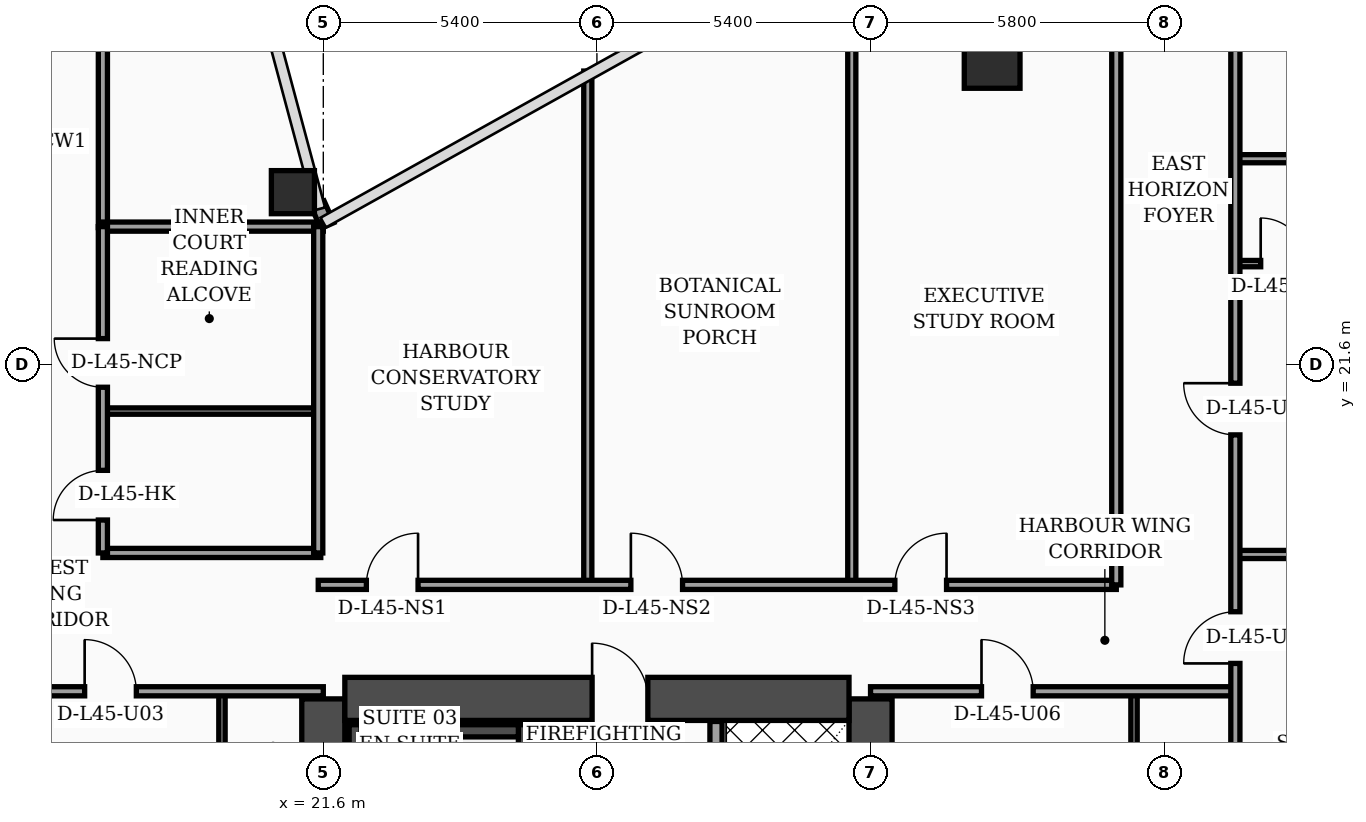
"""IFC4 building model, lengths in metres.
Left out: names, types, materials, properties, quantities, classifications, styles, units other than length and angle.
Written with IfcOpenShell. Run it as: python <this file> out.ifc"""

import sys

from ifc_helpers import new_model, si_unit, direction, frame, frame_2d, origin, origin_2d, place, context, subcontext, project, spatial, rectangle, hollow_rectangle, circle, extrude, element, fill, save


model = new_model("IFC4")
c1 = context("Model", 3, precision=1e-05, world=origin(), true_north=direction((0.0, 1.0)))
c2 = subcontext(c1, "Body", "Model", "MODEL_VIEW")
j1 = project(units=[si_unit("LENGTHUNIT", "METRE"), si_unit("PLANEANGLEUNIT", "RADIAN")], contexts=[c1])
p1 = place(None, origin())
s1 = spatial("IfcSite", under=j1, at=p1, CompositionType="ELEMENT")
p2 = place(p1, origin())
s2 = spatial("IfcBuilding", under=s1, at=p2, CompositionType="ELEMENT")
p3 = place(p2, frame((0.0, 0.0, 182.7)))
s3 = spatial("IfcBuildingStorey", under=s2, at=p3, CompositionType="ELEMENT", Elevation=182.7)
for number, where, z_axis, x_axis in (
    (1, (21.6, 4.6, 0.0), (0.0, 0.0, 1.0), (0.0, 1.0, 0.0)),
    (2, (32.4, 4.6, 0.0), (0.0, 0.0, 1.0), (0.0, 1.0, 0.0)),
):
    element("IfcWall", number, at=place(p3, frame(where, z_axis=z_axis, x_axis=x_axis)), inside=s3, PredefinedType="SHEAR", context=c2, shape_type="SweptSolid", body=[
        extrude(rectangle(XDim=10.4, YDim=0.85, at=frame_2d((5.2, 0.0))), origin(), (0.0, 0.0, 1.0), 3.52),
    ])
p4 = place(p3, frame((22.025, 15.0, 0.0), z_axis=(0.0, 0.0, 1.0), x_axis=(1.0, 0.0, 0.0)))
e3 = element("IfcWall", 3, at=p4, inside=s3, PredefinedType="SHEAR", context=c2, shape_type="SweptSolid", body=[
    extrude(rectangle(XDim=9.95, YDim=0.85, at=frame_2d((4.975, 0.0))), origin(), (0.0, 0.0, 1.0), 3.52),
])
p5 = place(p4, frame((4.88, 0.0, 0.0)))
e4 = element("IfcOpeningElement", 4, at=p5, cuts=e3, PredefinedType="OPENING", context=c2, shape_type="SweptSolid", body=[
    extrude(rectangle(XDim=1.1, YDim=2.2, at=frame_2d((0.55, 1.1))), frame((0.0, 0.435, 0.0), z_axis=(0.0, -1.0, 0.0), x_axis=(1.0, 0.0, 0.0)), (0.0, 0.0, 1.0), 0.87),
])
p6 = place(p3, frame((22.23, 5.025, 0.0), z_axis=(0.0, 0.0, 1.0), x_axis=(0.0, 1.0, 0.0)))
e5 = element("IfcWall", 5, at=p6, inside=s3, PredefinedType="SOLIDWALL", context=c2, shape_type="SweptSolid", body=[
    extrude(rectangle(XDim=9.465, YDim=0.24, at=frame_2d((4.732, 0.0))), origin(), (0.0, 0.0, 1.0), 3.52),
])
p7 = place(p3, frame((25.57, 5.025, 0.0), z_axis=(0.0, 0.0, 1.0), x_axis=(0.0, 1.0, 0.0)))
e6 = element("IfcWall", 6, at=p7, inside=s3, PredefinedType="SOLIDWALL", context=c2, shape_type="SweptSolid", body=[
    extrude(rectangle(XDim=9.465, YDim=0.24, at=frame_2d((4.732, 0.0))), origin(), (0.0, 0.0, 1.0), 3.52),
])
p8 = place(p7, frame((0.35, 0.0, 0.0)))
e7 = element("IfcOpeningElement", 7, at=p8, cuts=e6, PredefinedType="OPENING", context=c2, shape_type="SweptSolid", body=[
    extrude(rectangle(XDim=1.15, YDim=2.2, at=frame_2d((0.575, 1.1))), frame((0.0, 0.13, 0.0), z_axis=(0.0, -1.0, 0.0), x_axis=(1.0, 0.0, 0.0)), (0.0, 0.0, 1.0), 0.26),
])
p9 = place(p3, frame((22.35, 14.37, 0.0), z_axis=(0.0, 0.0, 1.0), x_axis=(1.0, 0.0, 0.0)))
e8 = element("IfcWall", 8, at=p9, inside=s3, PredefinedType="SOLIDWALL", context=c2, shape_type="SweptSolid", body=[
    extrude(rectangle(XDim=3.1, YDim=0.24, at=frame_2d((1.55, 0.0))), origin(), (0.0, 0.0, 1.0), 3.52),
])
p10 = place(p3, frame((21.0, 25.0, 0.0), z_axis=(0.0, 0.0, 1.0), x_axis=(1.0, 0.0, 0.0)))
e9 = element("IfcColumn", 9, at=p10, inside=s3, PredefinedType="COLUMN", context=c2, shape_type="SweptSolid", body=[
    extrude(hollow_rectangle(XDim=0.85, YDim=0.85, WallThickness=0.036, at=origin_2d()), origin(), (0.0, 0.0, 1.0), 3.52),
])
p11 = place(p3, frame((34.8, 27.6, 0.0), z_axis=(0.0, 0.0, 1.0), x_axis=(1.0, 0.0, 0.0)))
e10 = element("IfcColumn", 10, at=p11, inside=s3, PredefinedType="COLUMN", context=c2, shape_type="SweptSolid", body=[
    extrude(circle(Radius=0.55, at=origin_2d()), origin(), (0.0, 0.0, 1.0), 3.52),
])
p12 = place(p3, frame((21.68, 24.34, 0.0), z_axis=(0.0, 0.0, 1.0), x_axis=(-0.40758134973, 0.913168901875, 0.0)))
e11 = element("IfcWall", 11, at=p12, inside=s3, PredefinedType="SOLIDWALL", context=c2, shape_type="SweptSolid", body=[
    extrude(rectangle(XDim=0.471, YDim=0.28, at=frame_2d((0.235, 0.0))), origin(), (0.0, 0.0, 1.0), 3.52),
])
p13 = place(p3, frame((29.35, 5.045, 0.0), z_axis=(0.0, 0.0, 1.0), x_axis=(0.0, 1.0, 0.0)))
e12 = element("IfcWall", 12, at=p13, inside=s3, PredefinedType="SOLIDWALL", context=c2, shape_type="SweptSolid", body=[
    extrude(rectangle(XDim=9.51, YDim=0.24, at=frame_2d((4.755, 0.0))), origin(), (0.0, 0.0, 1.0), 3.52),
])
p14 = place(p13, frame((0.55, 0.0, 0.0)))
e13 = element("IfcOpeningElement", 13, at=p14, cuts=e12, PredefinedType="OPENING", context=c2, shape_type="SweptSolid", body=[
    extrude(rectangle(XDim=1.3, YDim=2.35, at=frame_2d((0.65, 1.175))), frame((0.0, 0.13, 0.0), z_axis=(0.0, -1.0, 0.0), x_axis=(1.0, 0.0, 0.0)), (0.0, 0.0, 1.0), 0.26),
])
p15 = place(p3, frame((19.6, 2.44, 0.0), z_axis=(0.0, 0.0, 1.0), x_axis=(0.0, 1.0, 0.0)))
e14 = element("IfcWall", 14, at=p15, inside=s3, PredefinedType="PARTITIONING", context=c2, shape_type="SweptSolid", body=[
    extrude(rectangle(XDim=12.71, YDim=0.125, at=frame_2d((6.355, 0.0))), origin(), (0.0, 0.0, 1.0), 2.47),
])
p16 = place(p15, frame((4.34, 0.0, 0.0)))
e15 = element("IfcOpeningElement", 15, at=p16, cuts=e14, PredefinedType="OPENING", context=c2, shape_type="SweptSolid", body=[
    extrude(rectangle(XDim=0.96, YDim=2.2, at=frame_2d((0.48, 1.1))), frame((0.0, 0.073, 0.0), z_axis=(0.0, -1.0, 0.0), x_axis=(1.0, 0.0, 0.0)), (0.0, 0.0, 1.0), 0.145),
])
p17 = place(p15, frame((10.18, 0.0, 0.0)))
e16 = element("IfcOpeningElement", 16, at=p17, cuts=e14, PredefinedType="OPENING", context=c2, shape_type="SweptSolid", body=[
    extrude(rectangle(XDim=0.9, YDim=2.15, at=frame_2d((0.45, 1.075))), frame((0.0, 0.073, 0.0), z_axis=(0.0, -1.0, 0.0), x_axis=(1.0, 0.0, 0.0)), (0.0, 0.0, 1.0), 0.145),
])
p18 = place(p3, frame((15.15, 15.15, 0.0), z_axis=(0.0, 0.0, 1.0), x_axis=(1.0, 0.0, 0.0)))
e17 = element("IfcWall", 17, at=p18, inside=s3, PredefinedType="PARTITIONING", context=c2, shape_type="SweptSolid", body=[
    extrude(rectangle(XDim=6.45, YDim=0.18, at=frame_2d((3.225, 0.0))), origin(), (0.0, 0.0, 1.0), 2.47),
])
p19 = place(p18, frame((1.74, 0.0, 0.0)))
e18 = element("IfcOpeningElement", 18, at=p19, cuts=e17, PredefinedType="OPENING", context=c2, shape_type="SweptSolid", body=[
    extrude(rectangle(XDim=1.02, YDim=2.2, at=frame_2d((0.51, 1.1))), frame((0.0, 0.1, 0.0), z_axis=(0.0, -1.0, 0.0), x_axis=(1.0, 0.0, 0.0)), (0.0, 0.0, 1.0), 0.2),
])
p20 = place(p3, frame((17.25, 24.3, 0.0), z_axis=(0.0, 0.0, 1.0), x_axis=(0.0, 1.0, 0.0)))
e19 = element("IfcWall", 19, at=p20, inside=s3, PredefinedType="PARTITIONING", context=c2, shape_type="SweptSolid", body=[
    extrude(rectangle(XDim=17.65, YDim=0.18, at=frame_2d((8.825, 0.0))), origin(), (0.0, 0.0, 1.0), 2.92),
])
p21 = place(p3, frame((17.25, 17.88, 0.0), z_axis=(0.0, 0.0, 1.0), x_axis=(1.0, 0.0, 0.0)))
e20 = element("IfcWall", 20, at=p21, inside=s3, PredefinedType="PARTITIONING", context=c2, shape_type="SweptSolid", body=[
    extrude(rectangle(XDim=4.3, YDim=0.18, at=frame_2d((2.15, 0.0))), origin(), (0.0, 0.0, 1.0), 3.52),
])
p22 = place(p3, frame((17.25, 20.68, 0.0), z_axis=(0.0, 0.0, 1.0), x_axis=(1.0, 0.0, 0.0)))
e21 = element("IfcWall", 21, at=p22, inside=s3, PredefinedType="PARTITIONING", context=c2, shape_type="SweptSolid", body=[
    extrude(rectangle(XDim=4.3, YDim=0.125, at=frame_2d((2.15, 0.0))), origin(), (0.0, 0.0, 1.0), 3.52),
])
p23 = place(p3, frame((17.25, 24.32, 0.0), z_axis=(0.0, 0.0, 1.0), x_axis=(1.0, 0.0, 0.0)))
e22 = element("IfcWall", 22, at=p23, inside=s3, PredefinedType="PARTITIONING", context=c2, shape_type="SweptSolid", body=[
    extrude(rectangle(XDim=4.35, YDim=0.18, at=frame_2d((2.175, 0.0))), origin(), (0.0, 0.0, 1.0), 3.52),
])
p24 = place(p3, frame((21.5, 17.88, 0.0), z_axis=(0.0, 0.0, 1.0), x_axis=(0.0, 1.0, 0.0)))
e23 = element("IfcWall", 23, at=p24, inside=s3, PredefinedType="PARTITIONING", context=c2, shape_type="SweptSolid", body=[
    extrude(rectangle(XDim=6.44, YDim=0.18, at=frame_2d((3.22, 0.0))), origin(), (0.0, 0.0, 1.0), 3.52),
])
p25 = place(p3, frame((17.25, 17.88, 0.0), z_axis=(0.0, 0.0, 1.0), x_axis=(0.0, 1.0, 0.0)))
e24 = element("IfcWall", 24, at=p25, inside=s3, PredefinedType="PARTITIONING", context=c2, shape_type="SweptSolid", body=[
    extrude(rectangle(XDim=6.44, YDim=0.18, at=frame_2d((3.22, 0.0))), origin(), (0.0, 0.0, 1.0), 3.52),
])
p26 = place(p25, frame((0.65, 0.0, 0.0)))
e25 = element("IfcOpeningElement", 25, at=p26, cuts=e24, PredefinedType="OPENING", context=c2, shape_type="SweptSolid", body=[
    extrude(rectangle(XDim=0.98, YDim=2.15, at=frame_2d((0.49, 1.075))), frame((0.0, 0.1, 0.0), z_axis=(0.0, -1.0, 0.0), x_axis=(1.0, 0.0, 0.0)), (0.0, 0.0, 1.0), 0.2),
])
p27 = place(p25, frame((3.27, 0.0, 0.0)))
e26 = element("IfcOpeningElement", 26, at=p27, cuts=e24, PredefinedType="OPENING", context=c2, shape_type="SweptSolid", body=[
    extrude(rectangle(XDim=0.96, YDim=2.2, at=frame_2d((0.48, 1.1))), frame((0.0, 0.1, 0.0), z_axis=(0.0, -1.0, 0.0), x_axis=(1.0, 0.0, 0.0)), (0.0, 0.0, 1.0), 0.2),
])
p28 = place(p3, frame((37.6, 2.44, 0.0), z_axis=(0.0, 0.0, 1.0), x_axis=(0.0, 1.0, 0.0)))
e27 = element("IfcWall", 27, at=p28, inside=s3, PredefinedType="PARTITIONING", context=c2, shape_type="SweptSolid", body=[
    extrude(rectangle(XDim=12.71, YDim=0.125, at=frame_2d((6.355, 0.0))), origin(), (0.0, 0.0, 1.0), 2.92),
])
p29 = place(p28, frame((4.35, 0.0, 0.0)))
e28 = element("IfcOpeningElement", 28, at=p29, cuts=e27, PredefinedType="OPENING", context=c2, shape_type="SweptSolid", body=[
    extrude(rectangle(XDim=0.96, YDim=2.2, at=frame_2d((0.48, 1.1))), frame((0.0, 0.073, 0.0), z_axis=(0.0, -1.0, 0.0), x_axis=(1.0, 0.0, 0.0)), (0.0, 0.0, 1.0), 0.145),
])
p30 = place(p28, frame((10.21, 0.0, 0.0)))
e29 = element("IfcOpeningElement", 29, at=p30, cuts=e27, PredefinedType="OPENING", context=c2, shape_type="SweptSolid", body=[
    extrude(rectangle(XDim=0.9, YDim=2.15, at=frame_2d((0.45, 1.075))), frame((0.0, 0.073, 0.0), z_axis=(0.0, -1.0, 0.0), x_axis=(1.0, 0.0, 0.0)), (0.0, 0.0, 1.0), 0.145),
])
p31 = place(p3, frame((32.4, 15.15, 0.0), z_axis=(0.0, 0.0, 1.0), x_axis=(1.0, 0.0, 0.0)))
e30 = element("IfcWall", 30, at=p31, inside=s3, PredefinedType="PARTITIONING", context=c2, shape_type="SweptSolid", body=[
    extrude(rectangle(XDim=7.2, YDim=0.18, at=frame_2d((3.6, 0.0))), origin(), (0.0, 0.0, 1.0), 2.92),
])
p32 = place(p31, frame((2.19, 0.0, 0.0)))
e31 = element("IfcOpeningElement", 31, at=p32, cuts=e30, PredefinedType="OPENING", context=c2, shape_type="SweptSolid", body=[
    extrude(rectangle(XDim=1.02, YDim=2.2, at=frame_2d((0.51, 1.1))), frame((0.0, 0.1, 0.0), z_axis=(0.0, -1.0, 0.0), x_axis=(1.0, 0.0, 0.0)), (0.0, 0.0, 1.0), 0.2),
])
p33 = place(p3, frame((26.82, 17.25, 0.0), z_axis=(0.0, 0.0, 1.0), x_axis=(0.0, 1.0, 0.0)))
e32 = element("IfcWall", 32, at=p33, inside=s3, PredefinedType="PARTITIONING", context=c2, shape_type="SweptSolid", body=[
    extrude(rectangle(XDim=10.14, YDim=0.16, at=frame_2d((5.07, 0.0))), origin(), (0.0, 0.0, 1.0), 2.92),
])
p34 = place(p3, frame((32.03, 17.25, 0.0), z_axis=(0.0, 0.0, 1.0), x_axis=(0.0, 1.0, 0.0)))
e33 = element("IfcWall", 33, at=p34, inside=s3, PredefinedType="PARTITIONING", context=c2, shape_type="SweptSolid", body=[
    extrude(rectangle(XDim=13.04, YDim=0.16, at=frame_2d((6.52, 0.0))), origin(), (0.0, 0.0, 1.0), 2.92),
])
p35 = place(p3, frame((21.5, 17.25, 0.0), z_axis=(0.0, 0.0, 1.0), x_axis=(1.0, 0.0, 0.0)))
e34 = element("IfcWall", 34, at=p35, inside=s3, PredefinedType="PARTITIONING", context=c2, shape_type="SweptSolid", body=[
    extrude(rectangle(XDim=15.75, YDim=0.18, at=frame_2d((7.875, 0.0))), origin(), (0.0, 0.0, 1.0), 2.92),
])
p36 = place(p35, frame((0.95, 0.0, 0.0)))
e35 = element("IfcOpeningElement", 35, at=p36, cuts=e34, PredefinedType="OPENING", context=c2, shape_type="SweptSolid", body=[
    extrude(rectangle(XDim=1.02, YDim=2.2, at=frame_2d((0.51, 1.1))), frame((0.0, 0.1, 0.0), z_axis=(0.0, -1.0, 0.0), x_axis=(1.0, 0.0, 0.0)), (0.0, 0.0, 1.0), 0.2),
])
p37 = place(p35, frame((6.17, 0.0, 0.0)))
e36 = element("IfcOpeningElement", 36, at=p37, cuts=e34, PredefinedType="OPENING", context=c2, shape_type="SweptSolid", body=[
    extrude(rectangle(XDim=1.02, YDim=2.2, at=frame_2d((0.51, 1.1))), frame((0.0, 0.1, 0.0), z_axis=(0.0, -1.0, 0.0), x_axis=(1.0, 0.0, 0.0)), (0.0, 0.0, 1.0), 0.2),
])
p38 = place(p35, frame((11.38, 0.0, 0.0)))
e37 = element("IfcOpeningElement", 37, at=p38, cuts=e34, PredefinedType="OPENING", context=c2, shape_type="SweptSolid", body=[
    extrude(rectangle(XDim=1.02, YDim=2.2, at=frame_2d((0.51, 1.1))), frame((0.0, 0.1, 0.0), z_axis=(0.0, -1.0, 0.0), x_axis=(1.0, 0.0, 0.0)), (0.0, 0.0, 1.0), 0.2),
])
p39 = place(p3, frame((37.25, 17.25, 0.0), z_axis=(0.0, 0.0, 1.0), x_axis=(0.0, 1.0, 0.0)))
e38 = element("IfcWall", 38, at=p39, inside=s3, PredefinedType="PARTITIONING", context=c2, shape_type="SweptSolid", body=[
    extrude(rectangle(XDim=15.95, YDim=0.18, at=frame_2d((7.975, 0.0))), origin(), (0.0, 0.0, 1.0), 2.92),
])
p40 = place(p3, frame((39.6, 23.59, 0.0), z_axis=(0.0, 0.0, 1.0), x_axis=(1.0, 0.0, 0.0)))
e39 = element("IfcWall", 39, at=p40, inside=s3, PredefinedType="PARTITIONING", context=c2, shape_type="SweptSolid", body=[
    extrude(rectangle(XDim=13.87, YDim=0.125, at=frame_2d((6.935, 0.0))), origin(), (0.0, 0.0, 1.0), 2.92),
])
p41 = place(p40, frame((0.5, 0.0, 0.0)))
e40 = element("IfcOpeningElement", 40, at=p41, cuts=e39, PredefinedType="OPENING", context=c2, shape_type="SweptSolid", body=[
    extrude(rectangle(XDim=0.9, YDim=2.15, at=frame_2d((0.45, 1.075))), frame((0.0, 0.073, 0.0), z_axis=(0.0, -1.0, 0.0), x_axis=(1.0, 0.0, 0.0)), (0.0, 0.0, 1.0), 0.145),
])
p42 = place(p40, frame((3.6, 0.0, 0.0)))
e41 = element("IfcOpeningElement", 41, at=p42, cuts=e39, PredefinedType="OPENING", context=c2, shape_type="SweptSolid", body=[
    extrude(rectangle(XDim=0.96, YDim=2.2, at=frame_2d((0.48, 1.1))), frame((0.0, 0.073, 0.0), z_axis=(0.0, -1.0, 0.0), x_axis=(1.0, 0.0, 0.0)), (0.0, 0.0, 1.0), 0.145),
])
p43 = place(p3, frame((39.6, 25.66, 0.0), z_axis=(0.0, 0.0, 1.0), x_axis=(1.0, 0.0, 0.0)))
e42 = element("IfcWall", 42, at=p43, inside=s3, PredefinedType="PARTITIONING", context=c2, shape_type="SweptSolid", body=[
    extrude(rectangle(XDim=13.22, YDim=0.16, at=frame_2d((6.61, 0.0))), origin(), (0.0, 0.0, 1.0), 2.92),
])
p44 = place(p3, frame((39.6, 17.85, 0.0), z_axis=(0.0, 0.0, 1.0), x_axis=(1.0, 0.0, 0.0)))
e43 = element("IfcWall", 43, at=p44, inside=s3, PredefinedType="PARTITIONING", context=c2, shape_type="SweptSolid", body=[
    extrude(rectangle(XDim=15.68, YDim=0.16, at=frame_2d((7.84, 0.0))), origin(), (0.0, 0.0, 1.0), 2.92),
])
p45 = place(p3, frame((39.6, 2.44, 0.0), z_axis=(0.0, 0.0, 1.0), x_axis=(0.0, 1.0, 0.0)))
e44 = element("IfcWall", 44, at=p45, inside=s3, PredefinedType="PARTITIONING", context=c2, shape_type="SweptSolid", body=[
    extrude(rectangle(XDim=31.04, YDim=0.18, at=frame_2d((15.52, 0.0))), origin(), (0.0, 0.0, 1.0), 2.92),
])
p46 = place(p45, frame((13.26, 0.0, 0.0)))
e45 = element("IfcOpeningElement", 45, at=p46, cuts=e44, PredefinedType="OPENING", context=c2, shape_type="SweptSolid", body=[
    extrude(rectangle(XDim=1.02, YDim=2.2, at=frame_2d((0.51, 1.1))), frame((0.0, 0.1, 0.0), z_axis=(0.0, -1.0, 0.0), x_axis=(1.0, 0.0, 0.0)), (0.0, 0.0, 1.0), 0.2),
])
p47 = place(p45, frame((17.77, 0.0, 0.0)))
e46 = element("IfcOpeningElement", 46, at=p47, cuts=e44, PredefinedType="OPENING", context=c2, shape_type="SweptSolid", body=[
    extrude(rectangle(XDim=1.02, YDim=2.2, at=frame_2d((0.51, 1.1))), frame((0.0, 0.1, 0.0), z_axis=(0.0, -1.0, 0.0), x_axis=(1.0, 0.0, 0.0)), (0.0, 0.0, 1.0), 0.2),
])
p48 = place(p45, frame((25.58, 0.0, 0.0)))
e47 = element("IfcOpeningElement", 47, at=p48, cuts=e44, PredefinedType="OPENING", context=c2, shape_type="SweptSolid", body=[
    extrude(rectangle(XDim=1.02, YDim=2.2, at=frame_2d((0.51, 1.1))), frame((0.0, 0.1, 0.0), z_axis=(0.0, -1.0, 0.0), x_axis=(1.0, 0.0, 0.0)), (0.0, 0.0, 1.0), 0.2),
])
p49 = place(p19, origin())
e48 = element("IfcDoor", 48, at=p49, inside=s3, OperationType="SINGLE_SWING_LEFT", PredefinedType="DOOR", context=c2, shape_type="SweptSolid", body=[
    extrude(rectangle(XDim=1.02, YDim=2.2, at=frame_2d((0.51, 1.1))), frame((0.0, 0.025, 0.0), z_axis=(0.0, -1.0, 0.0), x_axis=(1.0, 0.0, 0.0)), (0.0, 0.0, 1.0), 0.05),
])
fill(e18, e48)
p50 = place(p26, origin())
e49 = element("IfcDoor", 49, at=p50, inside=s3, OperationType="SINGLE_SWING_LEFT", PredefinedType="DOOR", context=c2, shape_type="SweptSolid", body=[
    extrude(rectangle(XDim=0.98, YDim=2.15, at=frame_2d((0.49, 1.075))), frame((0.0, 0.025, 0.0), z_axis=(0.0, -1.0, 0.0), x_axis=(1.0, 0.0, 0.0)), (0.0, 0.0, 1.0), 0.05),
])
fill(e25, e49)
p51 = place(p27, origin())
e50 = element("IfcDoor", 50, at=p51, inside=s3, OperationType="SINGLE_SWING_RIGHT", PredefinedType="DOOR", context=c2, shape_type="SweptSolid", body=[
    extrude(rectangle(XDim=0.96, YDim=2.2, at=frame_2d((0.48, 1.1))), frame((0.0, 0.025, 0.0), z_axis=(0.0, -1.0, 0.0), x_axis=(1.0, 0.0, 0.0)), (0.0, 0.0, 1.0), 0.05),
])
fill(e26, e50)
p52 = place(p32, origin())
e51 = element("IfcDoor", 51, at=p52, inside=s3, OperationType="SINGLE_SWING_LEFT", PredefinedType="DOOR", context=c2, shape_type="SweptSolid", body=[
    extrude(rectangle(XDim=1.02, YDim=2.2, at=frame_2d((0.51, 1.1))), frame((0.0, 0.025, 0.0), z_axis=(0.0, -1.0, 0.0), x_axis=(1.0, 0.0, 0.0)), (0.0, 0.0, 1.0), 0.05),
])
fill(e31, e51)
p53 = place(p36, origin())
e52 = element("IfcDoor", 52, at=p53, inside=s3, OperationType="SINGLE_SWING_RIGHT", PredefinedType="DOOR", context=c2, shape_type="SweptSolid", body=[
    extrude(rectangle(XDim=1.02, YDim=2.2, at=frame_2d((0.51, 1.1))), frame((0.0, 0.025, 0.0), z_axis=(0.0, -1.0, 0.0), x_axis=(1.0, 0.0, 0.0)), (0.0, 0.0, 1.0), 0.05),
])
fill(e35, e52)
p54 = place(p37, origin())
e53 = element("IfcDoor", 53, at=p54, inside=s3, OperationType="SINGLE_SWING_LEFT", PredefinedType="DOOR", context=c2, shape_type="SweptSolid", body=[
    extrude(rectangle(XDim=1.02, YDim=2.2, at=frame_2d((0.51, 1.1))), frame((0.0, 0.025, 0.0), z_axis=(0.0, -1.0, 0.0), x_axis=(1.0, 0.0, 0.0)), (0.0, 0.0, 1.0), 0.05),
])
fill(e36, e53)
p55 = place(p38, origin())
e54 = element("IfcDoor", 54, at=p55, inside=s3, OperationType="SINGLE_SWING_RIGHT", PredefinedType="DOOR", context=c2, shape_type="SweptSolid", body=[
    extrude(rectangle(XDim=1.02, YDim=2.2, at=frame_2d((0.51, 1.1))), frame((0.0, 0.025, 0.0), z_axis=(0.0, -1.0, 0.0), x_axis=(1.0, 0.0, 0.0)), (0.0, 0.0, 1.0), 0.05),
])
fill(e37, e54)
p56 = place(p41, origin())
e55 = element("IfcDoor", 55, at=p56, inside=s3, OperationType="SINGLE_SWING_LEFT", PredefinedType="DOOR", context=c2, shape_type="SweptSolid", body=[
    extrude(rectangle(XDim=0.9, YDim=2.15, at=frame_2d((0.45, 1.075))), frame((0.0, 0.025, 0.0), z_axis=(0.0, -1.0, 0.0), x_axis=(1.0, 0.0, 0.0)), (0.0, 0.0, 1.0), 0.05),
])
fill(e40, e55)
p57 = place(p46, origin())
e56 = element("IfcDoor", 56, at=p57, inside=s3, OperationType="SINGLE_SWING_LEFT", PredefinedType="DOOR", context=c2, shape_type="SweptSolid", body=[
    extrude(rectangle(XDim=1.02, YDim=2.2, at=frame_2d((0.51, 1.1))), frame((0.0, 0.025, 0.0), z_axis=(0.0, -1.0, 0.0), x_axis=(1.0, 0.0, 0.0)), (0.0, 0.0, 1.0), 0.05),
])
fill(e45, e56)
p58 = place(p47, origin())
e57 = element("IfcDoor", 57, at=p58, inside=s3, OperationType="SINGLE_SWING_RIGHT", PredefinedType="DOOR", context=c2, shape_type="SweptSolid", body=[
    extrude(rectangle(XDim=1.02, YDim=2.2, at=frame_2d((0.51, 1.1))), frame((0.0, 0.025, 0.0), z_axis=(0.0, -1.0, 0.0), x_axis=(1.0, 0.0, 0.0)), (0.0, 0.0, 1.0), 0.05),
])
fill(e46, e57)
p59 = place(p5, origin())
e58 = element("IfcDoor", 58, at=p59, inside=s3, OperationType="SINGLE_SWING_LEFT", PredefinedType="DOOR", context=c2, shape_type="SweptSolid", body=[
    extrude(rectangle(XDim=1.1, YDim=2.2, at=frame_2d((0.55, 1.1))), frame((0.0, 0.025, 0.0), z_axis=(0.0, -1.0, 0.0), x_axis=(1.0, 0.0, 0.0)), (0.0, 0.0, 1.0), 0.05),
])
fill(e4, e58)
save(model, sys.argv[1])
